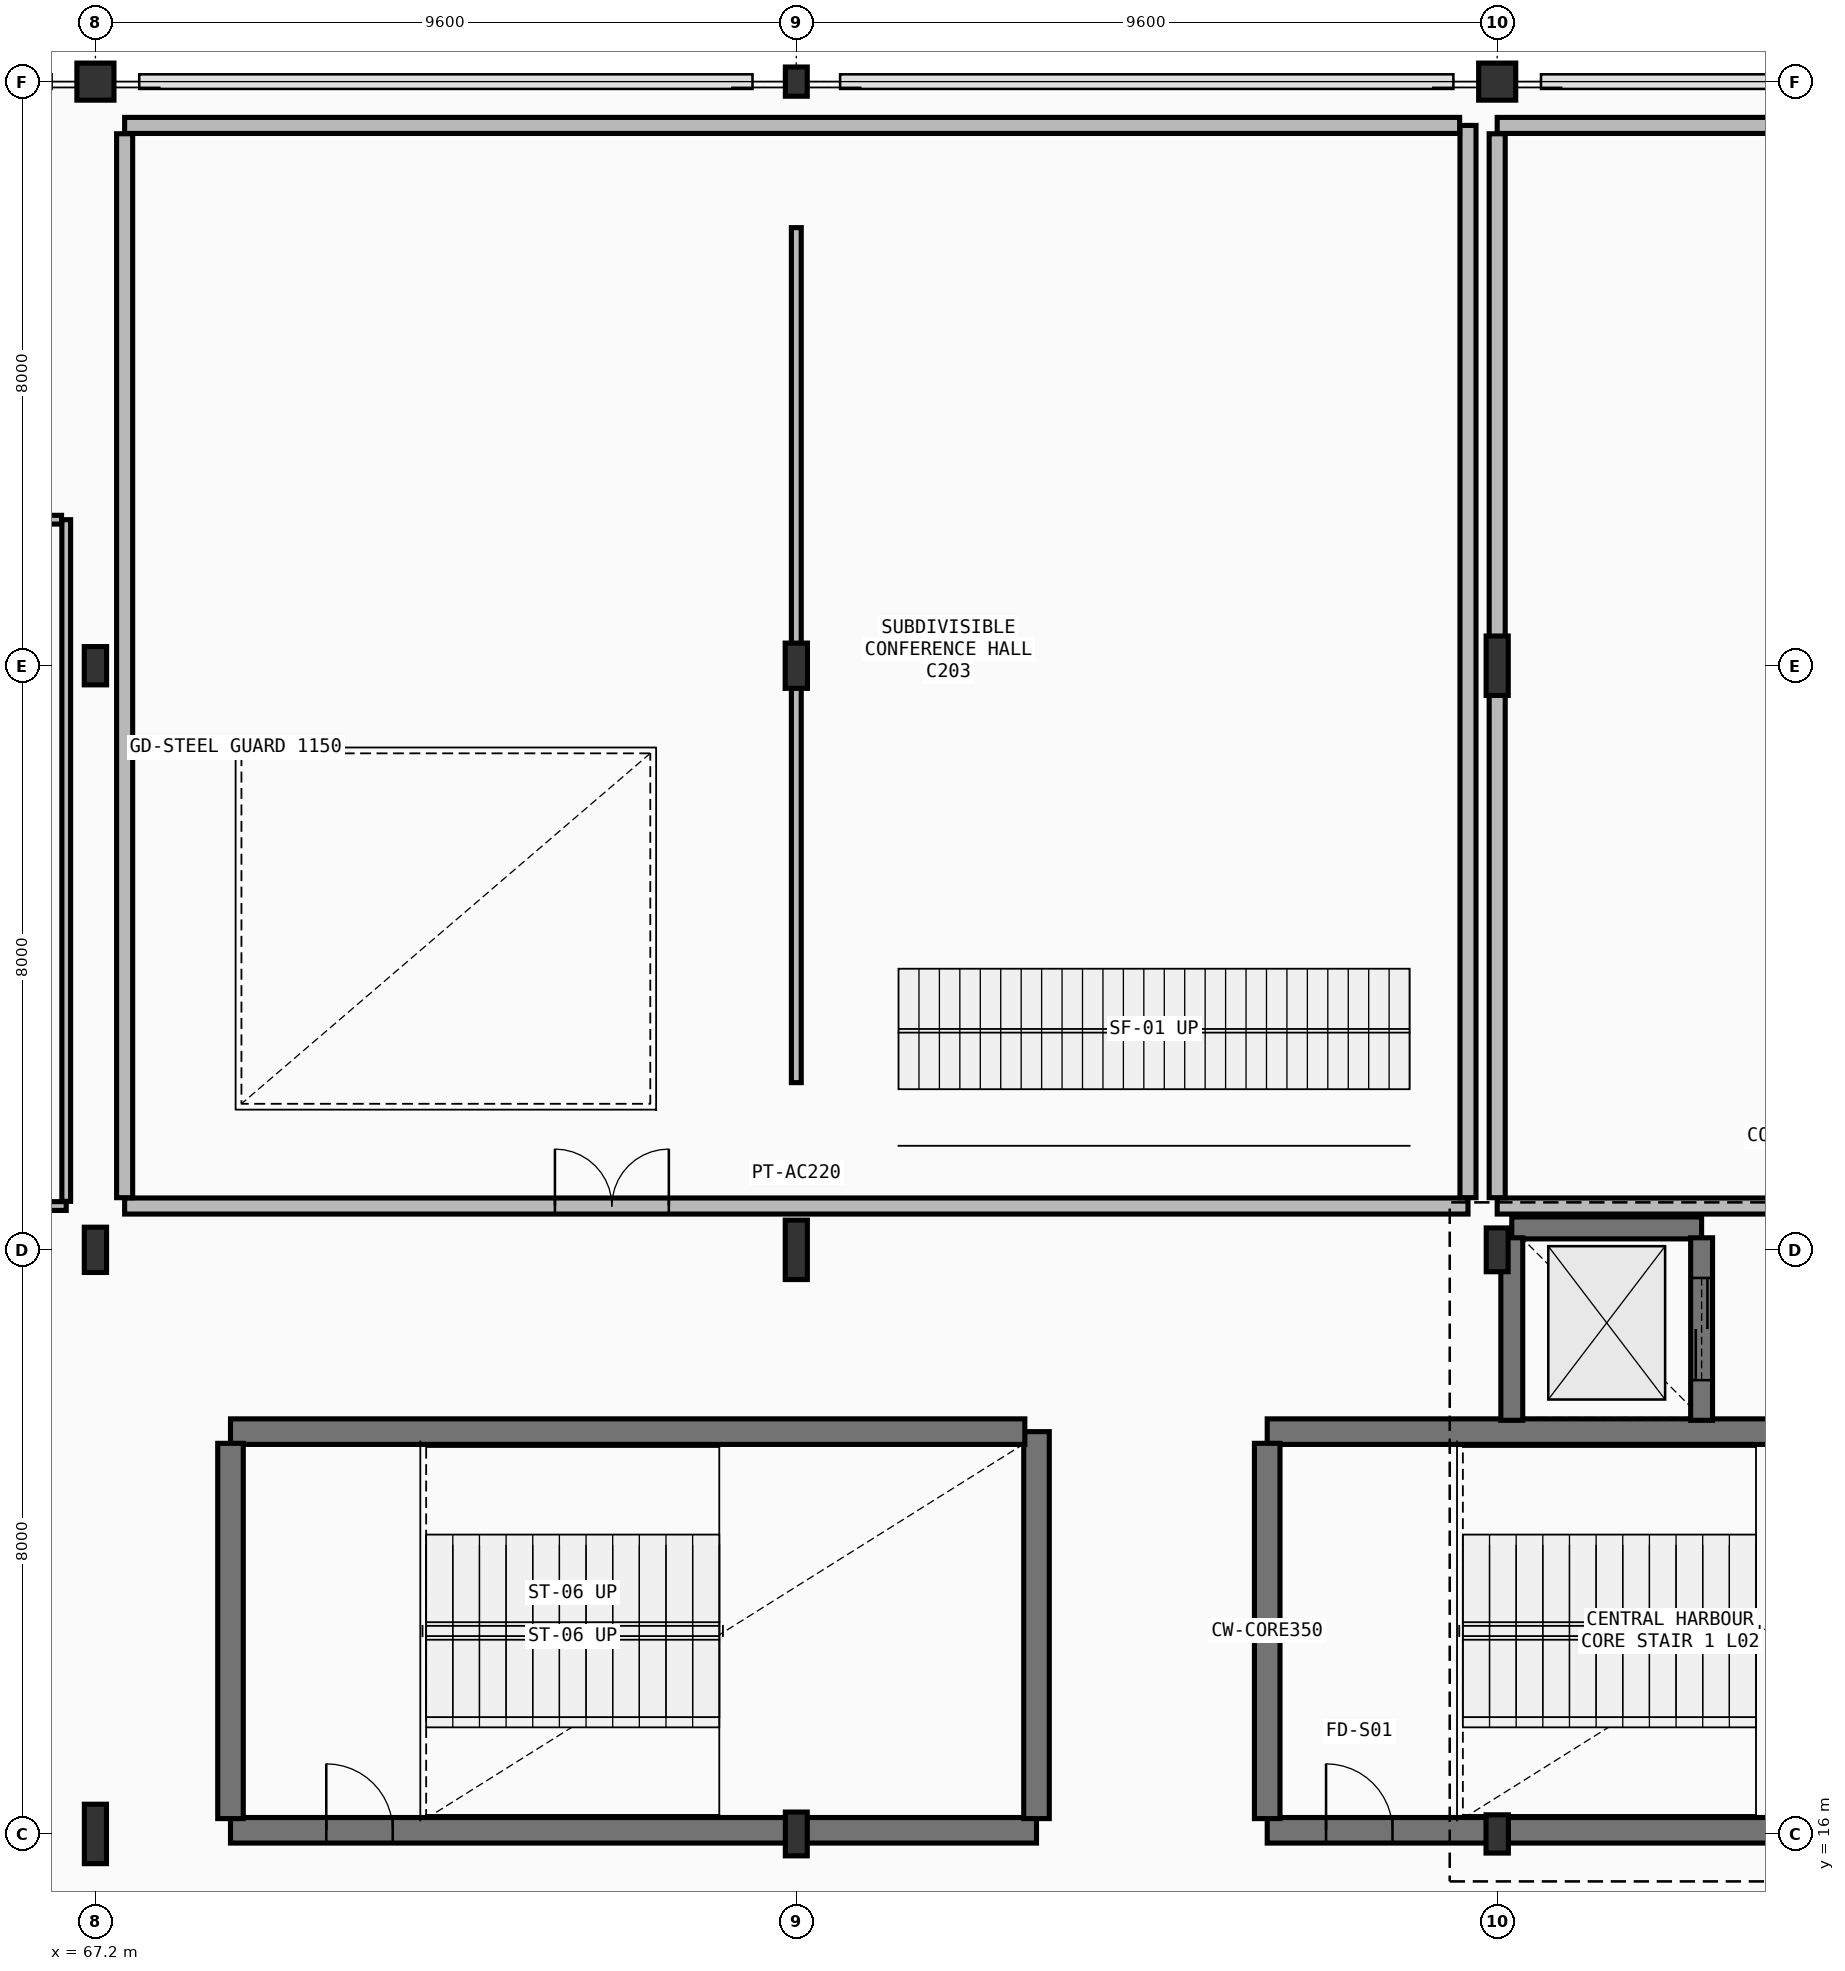
"""IFC4 building model, lengths in metres.
Left out: names, types, materials, properties, quantities, classifications, styles, units other than length and angle.
Written with IfcOpenShell. Run it as: python <this file> out.ifc"""

import sys

from ifc_helpers import new_model, si_unit, direction, frame, frame_2d, origin, origin_2d, place, context, subcontext, project, spatial, rectangle, hollow_circle, i_section, extrude, element, fill, save


model = new_model("IFC4")
c1 = context("Model", 3, precision=1e-05, world=origin(), true_north=direction((0.0, 1.0)))
c2 = subcontext(c1, "Body", "Model", "MODEL_VIEW")
j1 = project(units=[si_unit("LENGTHUNIT", "METRE"), si_unit("PLANEANGLEUNIT", "RADIAN")], contexts=[c1])
p1 = place(None, origin())
s1 = spatial("IfcSite", under=j1, at=p1, CompositionType="ELEMENT")
p2 = place(p1, origin())
s2 = spatial("IfcBuilding", under=s1, at=p2, CompositionType="ELEMENT")
p3 = place(p2, frame((0.0, 0.0, 11.4)))
s3 = spatial("IfcBuildingStorey", under=s2, at=p3, CompositionType="ELEMENT", Elevation=11.4)
p4 = place(p3, frame((67.2, 16.0, 0.0), z_axis=(0.0, 0.0, 1.0), x_axis=(1.0, 0.0, 0.0)))
e1 = element("IfcColumn", 1, at=p4, inside=s3, PredefinedType="COLUMN", context=c2, shape_type="SweptSolid", body=[
    extrude(i_section(OverallWidth=0.303, OverallDepth=0.814, WebThickness=0.021, FlangeThickness=0.04, FilletRadius=0.03, at=origin_2d()), origin(), (0.0, 0.0, 1.0), 4.5),
])
p5 = place(p3, frame((67.2, 24.0, 0.0), z_axis=(0.0, 0.0, 1.0), x_axis=(1.0, 0.0, 0.0)))
e2 = element("IfcColumn", 2, at=p5, inside=s3, PredefinedType="COLUMN", context=c2, shape_type="SweptSolid", body=[
    extrude(i_section(OverallWidth=0.305, OverallDepth=0.62, WebThickness=0.021, FlangeThickness=0.04, FilletRadius=0.027, at=origin_2d()), origin(), (0.0, 0.0, 1.0), 4.5),
])
p6 = place(p3, frame((67.2, 32.0, 0.0), z_axis=(0.0, 0.0, 1.0), x_axis=(1.0, 0.0, 0.0)))
e3 = element("IfcColumn", 3, at=p6, inside=s3, PredefinedType="COLUMN", context=c2, shape_type="SweptSolid", body=[
    extrude(i_section(OverallWidth=0.306, OverallDepth=0.524, WebThickness=0.021, FlangeThickness=0.04, FilletRadius=0.027, at=origin_2d()), origin(), (0.0, 0.0, 1.0), 4.5),
])
p7 = place(p3, frame((67.2, 40.0, 0.0), z_axis=(0.0, 0.0, 1.0), x_axis=(1.0, 0.0, 0.0)))
e4 = element("IfcColumn", 4, at=p7, inside=s3, PredefinedType="COLUMN", context=c2, shape_type="SweptSolid", body=[
    extrude(hollow_circle(Radius=0.254, WallThickness=0.025, at=origin_2d()), origin(), (0.0, 0.0, 1.0), 4.5),
])
p8 = place(p3, frame((76.8, 16.0, 0.0), z_axis=(0.0, 0.0, 1.0), x_axis=(1.0, 0.0, 0.0)))
e5 = element("IfcColumn", 5, at=p8, inside=s3, PredefinedType="COLUMN", context=c2, shape_type="SweptSolid", body=[
    extrude(i_section(OverallWidth=0.3, OverallDepth=0.6, WebThickness=0.015, FlangeThickness=0.03, FilletRadius=0.027, at=origin_2d()), origin(), (0.0, 0.0, 1.0), 4.5),
])
p9 = place(p3, frame((76.8, 24.0, 0.0), z_axis=(0.0, 0.0, 1.0), x_axis=(1.0, 0.0, 0.0)))
e6 = element("IfcColumn", 6, at=p9, inside=s3, PredefinedType="COLUMN", context=c2, shape_type="SweptSolid", body=[
    extrude(i_section(OverallWidth=0.303, OverallDepth=0.814, WebThickness=0.021, FlangeThickness=0.04, FilletRadius=0.03, at=origin_2d()), origin(), (0.0, 0.0, 1.0), 4.5),
])
p10 = place(p3, frame((76.8, 32.0, 0.0), z_axis=(0.0, 0.0, 1.0), x_axis=(1.0, 0.0, 0.0)))
e7 = element("IfcColumn", 7, at=p10, inside=s3, PredefinedType="COLUMN", context=c2, shape_type="SweptSolid", body=[
    extrude(i_section(OverallWidth=0.305, OverallDepth=0.62, WebThickness=0.021, FlangeThickness=0.04, FilletRadius=0.027, at=origin_2d()), origin(), (0.0, 0.0, 1.0), 4.5),
])
p11 = place(p3, frame((76.8, 40.0, 0.0), z_axis=(0.0, 0.0, 1.0), x_axis=(1.0, 0.0, 0.0)))
e8 = element("IfcColumn", 8, at=p11, inside=s3, PredefinedType="COLUMN", context=c2, shape_type="SweptSolid", body=[
    extrude(i_section(OverallWidth=0.3, OverallDepth=0.4, WebThickness=0.013, FlangeThickness=0.024, FilletRadius=0.027, at=origin_2d()), origin(), (0.0, 0.0, 1.0), 4.5),
])
p12 = place(p3, frame((86.4, 16.0, 0.0), z_axis=(0.0, 0.0, 1.0), x_axis=(1.0, 0.0, 0.0)))
e9 = element("IfcColumn", 9, at=p12, inside=s3, PredefinedType="COLUMN", context=c2, shape_type="SweptSolid", body=[
    extrude(i_section(OverallWidth=0.306, OverallDepth=0.524, WebThickness=0.021, FlangeThickness=0.04, FilletRadius=0.027, at=origin_2d()), origin(), (0.0, 0.0, 1.0), 4.5),
])
p13 = place(p3, frame((86.4, 24.0, 0.0), z_axis=(0.0, 0.0, 1.0), x_axis=(1.0, 0.0, 0.0)))
e10 = element("IfcColumn", 10, at=p13, inside=s3, PredefinedType="COLUMN", context=c2, shape_type="SweptSolid", body=[
    extrude(i_section(OverallWidth=0.3, OverallDepth=0.6, WebThickness=0.015, FlangeThickness=0.03, FilletRadius=0.027, at=origin_2d()), origin(), (0.0, 0.0, 1.0), 4.5),
])
p14 = place(p3, frame((86.4, 32.0, 0.0), z_axis=(0.0, 0.0, 1.0), x_axis=(1.0, 0.0, 0.0)))
e11 = element("IfcColumn", 11, at=p14, inside=s3, PredefinedType="COLUMN", context=c2, shape_type="SweptSolid", body=[
    extrude(i_section(OverallWidth=0.303, OverallDepth=0.814, WebThickness=0.021, FlangeThickness=0.04, FilletRadius=0.03, at=origin_2d()), origin(), (0.0, 0.0, 1.0), 4.5),
])
p15 = place(p3, frame((86.4, 40.0, 0.0), z_axis=(0.0, 0.0, 1.0), x_axis=(1.0, 0.0, 0.0)))
e12 = element("IfcColumn", 12, at=p15, inside=s3, PredefinedType="COLUMN", context=c2, shape_type="SweptSolid", body=[
    extrude(hollow_circle(Radius=0.254, WallThickness=0.025, at=origin_2d()), origin(), (0.0, 0.0, 1.0), 4.5),
])
p16 = place(p3, frame((83.25, 16.05, 0.0), z_axis=(0.0, 0.0, 1.0), x_axis=(1.0, 0.0, 0.0)))
e13 = element("IfcWall", 13, at=p16, inside=s3, PredefinedType="SHEAR", context=c2, shape_type="SweptSolid", body=[
    extrude(rectangle(XDim=11.04, YDim=0.35, at=frame_2d((5.52, 0.0))), origin(), (0.0, 0.0, 1.0), 4.27),
])
p17 = place(p16, frame((0.806, 0.0, 0.0)))
e14 = element("IfcOpeningElement", 14, at=p17, cuts=e13, PredefinedType="OPENING", context=c2, shape_type="SweptSolid", body=[
    extrude(rectangle(XDim=0.91, YDim=2.08, at=frame_2d((0.455, 1.04))), frame((0.0, 0.185, 0.0), z_axis=(0.0, -1.0, 0.0), x_axis=(1.0, 0.0, 0.0)), (0.0, 0.0, 1.0), 0.37),
])
p18 = place(p3, frame((94.13, 21.51, 0.0), z_axis=(0.0, 0.0, 1.0), x_axis=(-1.0, 0.0, 0.0)))
e15 = element("IfcWall", 15, at=p18, inside=s3, PredefinedType="SHEAR", context=c2, shape_type="SweptSolid", body=[
    extrude(rectangle(XDim=10.88, YDim=0.35, at=frame_2d((5.44, 0.0))), origin(), (0.0, 0.0, 1.0), 4.27),
])
p19 = place(p3, frame((83.25, 21.35, 0.0), z_axis=(0.0, 0.0, 1.0), x_axis=(0.0, -1.0, 0.0)))
e16 = element("IfcWall", 16, at=p19, inside=s3, PredefinedType="SHEAR", context=c2, shape_type="SweptSolid", body=[
    extrude(rectangle(XDim=5.14, YDim=0.35, at=frame_2d((2.57, 0.0))), origin(), (0.0, 0.0, 1.0), 4.27),
])
p20 = place(p3, frame((69.05, 16.05, 0.0), z_axis=(0.0, 0.0, 1.0), x_axis=(1.0, 0.0, 0.0)))
e17 = element("IfcWall", 17, at=p20, inside=s3, PredefinedType="SHEAR", context=c2, shape_type="SweptSolid", body=[
    extrude(rectangle(XDim=11.04, YDim=0.35, at=frame_2d((5.52, 0.0))), origin(), (0.0, 0.0, 1.0), 4.27),
])
p21 = place(p20, frame((1.312, 0.0, 0.0)))
e18 = element("IfcOpeningElement", 18, at=p21, cuts=e17, PredefinedType="OPENING", context=c2, shape_type="SweptSolid", body=[
    extrude(rectangle(XDim=0.91, YDim=2.08, at=frame_2d((0.455, 1.04))), frame((0.0, 0.185, 0.0), z_axis=(0.0, -1.0, 0.0), x_axis=(1.0, 0.0, 0.0)), (0.0, 0.0, 1.0), 0.37),
])
p22 = place(p3, frame((80.09, 16.21, 0.0), z_axis=(0.0, 0.0, 1.0), x_axis=(0.0, 1.0, 0.0)))
e19 = element("IfcWall", 19, at=p22, inside=s3, PredefinedType="SHEAR", context=c2, shape_type="SweptSolid", body=[
    extrude(rectangle(XDim=5.3, YDim=0.35, at=frame_2d((2.65, 0.0))), origin(), (0.0, 0.0, 1.0), 4.27),
])
p23 = place(p3, frame((79.93, 21.51, 0.0), z_axis=(0.0, 0.0, 1.0), x_axis=(-1.0, 0.0, 0.0)))
e20 = element("IfcWall", 20, at=p23, inside=s3, PredefinedType="SHEAR", context=c2, shape_type="SweptSolid", body=[
    extrude(rectangle(XDim=10.88, YDim=0.35, at=frame_2d((5.44, 0.0))), origin(), (0.0, 0.0, 1.0), 4.27),
])
p24 = place(p3, frame((69.05, 21.35, 0.0), z_axis=(0.0, 0.0, 1.0), x_axis=(0.0, -1.0, 0.0)))
e21 = element("IfcWall", 21, at=p24, inside=s3, PredefinedType="SHEAR", context=c2, shape_type="SweptSolid", body=[
    extrude(rectangle(XDim=5.14, YDim=0.35, at=frame_2d((2.57, 0.0))), origin(), (0.0, 0.0, 1.0), 4.27),
])
p25 = place(p3, frame((89.2, 24.3, 0.0), z_axis=(0.0, 0.0, 1.0), x_axis=(-1.0, 0.0, 0.0)))
e22 = element("IfcWall", 22, at=p25, inside=s3, PredefinedType="SHEAR", context=c2, shape_type="SweptSolid", body=[
    extrude(rectangle(XDim=2.6, YDim=0.3, at=frame_2d((1.3, 0.0))), origin(), (0.0, 0.0, 1.0), 4.27),
])
p26 = place(p3, frame((89.2, 21.665, 0.0), z_axis=(0.0, 0.0, 1.0), x_axis=(0.0, 1.0, 0.0)))
e23 = element("IfcWall", 23, at=p26, inside=s3, PredefinedType="SHEAR", context=c2, shape_type="SweptSolid", body=[
    extrude(rectangle(XDim=2.5, YDim=0.3, at=frame_2d((1.25, 0.0))), origin(), (0.0, 0.0, 1.0), 4.27),
])
p27 = place(p26, frame((0.55, 0.0, 0.0)))
e24 = element("IfcOpeningElement", 24, at=p27, cuts=e23, PredefinedType="OPENING", context=c2, shape_type="SweptSolid", body=[
    extrude(rectangle(XDim=1.4, YDim=2.26, at=frame_2d((0.7, 1.13))), frame((0.0, 0.16, 0.0), z_axis=(0.0, -1.0, 0.0), x_axis=(1.0, 0.0, 0.0)), (0.0, 0.0, 1.0), 0.32),
])
p28 = place(p3, frame((86.6, 24.165, 0.0), z_axis=(0.0, 0.0, 1.0), x_axis=(0.0, -1.0, 0.0)))
e25 = element("IfcWall", 25, at=p28, inside=s3, PredefinedType="SHEAR", context=c2, shape_type="SweptSolid", body=[
    extrude(rectangle(XDim=2.5, YDim=0.3, at=frame_2d((1.25, 0.0))), origin(), (0.0, 0.0, 1.0), 4.27),
])
p29 = place(p3, frame((67.6, 24.6, 0.0), z_axis=(0.0, 0.0, 1.0), x_axis=(1.0, 0.0, 0.0)))
e26 = element("IfcWall", 26, at=p29, inside=s3, PredefinedType="PARTITIONING", context=c2, shape_type="SweptSolid", body=[
    extrude(rectangle(XDim=18.4, YDim=0.22, at=frame_2d((9.2, 0.0))), origin(), (0.0, 0.0, 1.0), 3.74),
])
p30 = place(p29, frame((5.894, 0.0, 0.0)))
e27 = element("IfcOpeningElement", 27, at=p30, cuts=e26, PredefinedType="OPENING", context=c2, shape_type="SweptSolid", body=[
    extrude(rectangle(XDim=1.56, YDim=2.18, at=frame_2d((0.78, 1.09))), frame((0.0, 0.12, 0.0), z_axis=(0.0, -1.0, 0.0), x_axis=(1.0, 0.0, 0.0)), (0.0, 0.0, 1.0), 0.24),
])
p31 = place(p3, frame((86.0, 24.714, 0.0), z_axis=(0.0, 0.0, 1.0), x_axis=(0.0, 1.0, 0.0)))
e28 = element("IfcWall", 28, at=p31, inside=s3, PredefinedType="PARTITIONING", context=c2, shape_type="SweptSolid", body=[
    extrude(rectangle(XDim=14.686, YDim=0.22, at=frame_2d((7.343, 0.0))), origin(), (0.0, 0.0, 1.0), 3.74),
])
p32 = place(p3, frame((85.886, 39.4, 0.0), z_axis=(0.0, 0.0, 1.0), x_axis=(-1.0, 0.0, 0.0)))
e29 = element("IfcWall", 29, at=p32, inside=s3, PredefinedType="PARTITIONING", context=c2, shape_type="SweptSolid", body=[
    extrude(rectangle(XDim=18.286, YDim=0.22, at=frame_2d((9.143, 0.0))), origin(), (0.0, 0.0, 1.0), 3.64),
])
p33 = place(p3, frame((67.6, 39.286, 0.0), z_axis=(0.0, 0.0, 1.0), x_axis=(0.0, -1.0, 0.0)))
e30 = element("IfcWall", 30, at=p33, inside=s3, PredefinedType="PARTITIONING", context=c2, shape_type="SweptSolid", body=[
    extrude(rectangle(XDim=14.572, YDim=0.22, at=frame_2d((7.286, 0.0))), origin(), (0.0, 0.0, 1.0), 3.69),
])
p34 = place(p3, frame((76.8, 26.29, 0.0), z_axis=(0.0, 0.0, 1.0), x_axis=(0.0, 1.0, 0.0)))
e31 = element("IfcWall", 31, at=p34, inside=s3, PredefinedType="MOVABLE", context=c2, shape_type="SweptSolid", body=[
    extrude(rectangle(XDim=11.71, YDim=0.135, at=frame_2d((5.855, 0.0))), origin(), (0.0, 0.0, 1.0), 3.64),
])
p35 = place(p3, frame((86.4, 24.6, 0.0), z_axis=(0.0, 0.0, 1.0), x_axis=(1.0, 0.0, 0.0)))
e32 = element("IfcWall", 32, at=p35, inside=s3, PredefinedType="PARTITIONING", context=c2, shape_type="SweptSolid", body=[
    extrude(rectangle(XDim=19.2, YDim=0.22, at=frame_2d((9.6, 0.0))), origin(), (0.0, 0.0, 1.0), 3.34),
])
p36 = place(p35, frame((11.414, 0.0, 0.0)))
e33 = element("IfcOpeningElement", 33, at=p36, cuts=e32, PredefinedType="OPENING", context=c2, shape_type="SweptSolid", body=[
    extrude(rectangle(XDim=1.64, YDim=2.2, at=frame_2d((0.82, 1.1))), frame((0.0, 0.12, 0.0), z_axis=(0.0, -1.0, 0.0), x_axis=(1.0, 0.0, 0.0)), (0.0, 0.0, 1.0), 0.24),
])
p37 = place(p35, frame((14.157, 0.0, 0.0)))
e34 = element("IfcOpeningElement", 34, at=p37, cuts=e32, PredefinedType="OPENING", context=c2, shape_type="SweptSolid", body=[
    extrude(rectangle(XDim=1.05, YDim=2.35, at=frame_2d((0.525, 1.175))), frame((0.0, 0.12, 0.0), z_axis=(0.0, -1.0, 0.0), x_axis=(1.0, 0.0, 0.0)), (0.0, 0.0, 1.0), 0.24),
])
p38 = place(p3, frame((105.486, 39.4, 0.0), z_axis=(0.0, 0.0, 1.0), x_axis=(-1.0, 0.0, 0.0)))
e35 = element("IfcWall", 35, at=p38, inside=s3, PredefinedType="PARTITIONING", context=c2, shape_type="SweptSolid", body=[
    extrude(rectangle(XDim=19.086, YDim=0.22, at=frame_2d((9.543, 0.0))), origin(), (0.0, 0.0, 1.0), 3.34),
])
p39 = place(p3, frame((86.4, 39.286, 0.0), z_axis=(0.0, 0.0, 1.0), x_axis=(0.0, -1.0, 0.0)))
e36 = element("IfcWall", 36, at=p39, inside=s3, PredefinedType="PARTITIONING", context=c2, shape_type="SweptSolid", body=[
    extrude(rectangle(XDim=14.572, YDim=0.22, at=frame_2d((7.286, 0.0))), origin(), (0.0, 0.0, 1.0), 3.64),
])
p40 = place(p3, frame((60.947, 24.6, 0.0), z_axis=(0.0, 0.0, 1.0), x_axis=(1.0, 0.0, 0.0)))
e37 = element("IfcWall", 37, at=p40, inside=s3, PredefinedType="PARTITIONING", context=c2, shape_type="SweptSolid", body=[
    extrude(rectangle(XDim=5.854, YDim=0.12, at=frame_2d((2.927, 0.0))), origin(), (0.0, 0.0, 1.0), 4.27),
])
p41 = place(p40, frame((2.452, 0.0, 0.0)))
e38 = element("IfcOpeningElement", 38, at=p41, cuts=e37, PredefinedType="OPENING", context=c2, shape_type="SweptSolid", body=[
    extrude(rectangle(XDim=0.95, YDim=2.18, at=frame_2d((0.475, 1.09))), frame((0.0, 0.07, 0.0), z_axis=(0.0, -1.0, 0.0), x_axis=(1.0, 0.0, 0.0)), (0.0, 0.0, 1.0), 0.14),
])
p42 = place(p3, frame((66.8, 24.664, 0.0), z_axis=(0.0, 0.0, 1.0), x_axis=(0.0, 1.0, 0.0)))
e39 = element("IfcWall", 39, at=p42, inside=s3, PredefinedType="PARTITIONING", context=c2, shape_type="SweptSolid", body=[
    extrude(rectangle(XDim=9.336, YDim=0.12, at=frame_2d((4.668, 0.0))), origin(), (0.0, 0.0, 1.0), 3.64),
])
p43 = place(p3, frame((66.736, 34.0, 0.0), z_axis=(0.0, 0.0, 1.0), x_axis=(-1.0, 0.0, 0.0)))
e40 = element("IfcWall", 40, at=p43, inside=s3, PredefinedType="PARTITIONING", context=c2, shape_type="SweptSolid", body=[
    extrude(rectangle(XDim=5.79, YDim=0.12, at=frame_2d((2.895, 0.0))), origin(), (0.0, 0.0, 1.0), 4.27),
])
p44 = place(p17, origin())
e41 = element("IfcDoor", 41, at=p44, inside=s3, OperationType="SINGLE_SWING_RIGHT", PredefinedType="DOOR", context=c2, shape_type="SweptSolid", body=[
    extrude(rectangle(XDim=0.91, YDim=2.08, at=frame_2d((0.455, 1.04))), frame((0.0, 0.025, 0.0), z_axis=(0.0, -1.0, 0.0), x_axis=(1.0, 0.0, 0.0)), (0.0, 0.0, 1.0), 0.05),
])
fill(e14, e41)
p45 = place(p21, origin())
e42 = element("IfcDoor", 42, at=p45, inside=s3, OperationType="SINGLE_SWING_LEFT", PredefinedType="DOOR", context=c2, shape_type="SweptSolid", body=[
    extrude(rectangle(XDim=0.91, YDim=2.08, at=frame_2d((0.455, 1.04))), frame((0.0, 0.025, 0.0), z_axis=(0.0, -1.0, 0.0), x_axis=(1.0, 0.0, 0.0)), (0.0, 0.0, 1.0), 0.05),
])
fill(e18, e42)
p46 = place(p27, origin())
e43 = element("IfcDoor", 43, at=p46, inside=s3, OperationType="DOUBLE_DOOR_SLIDING", PredefinedType="DOOR", context=c2, shape_type="SweptSolid", body=[
    extrude(rectangle(XDim=1.4, YDim=2.26, at=frame_2d((0.7, 1.13))), frame((0.0, 0.025, 0.0), z_axis=(0.0, -1.0, 0.0), x_axis=(1.0, 0.0, 0.0)), (0.0, 0.0, 1.0), 0.05),
])
fill(e24, e43)
p47 = place(p30, origin())
e44 = element("IfcDoor", 44, at=p47, inside=s3, OperationType="DOUBLE_DOOR_SINGLE_SWING", PredefinedType="DOOR", context=c2, shape_type="SweptSolid", body=[
    extrude(rectangle(XDim=1.56, YDim=2.18, at=frame_2d((0.78, 1.09))), frame((0.0, 0.025, 0.0), z_axis=(0.0, -1.0, 0.0), x_axis=(1.0, 0.0, 0.0)), (0.0, 0.0, 1.0), 0.05),
])
fill(e27, e44)
save(model, sys.argv[1])
